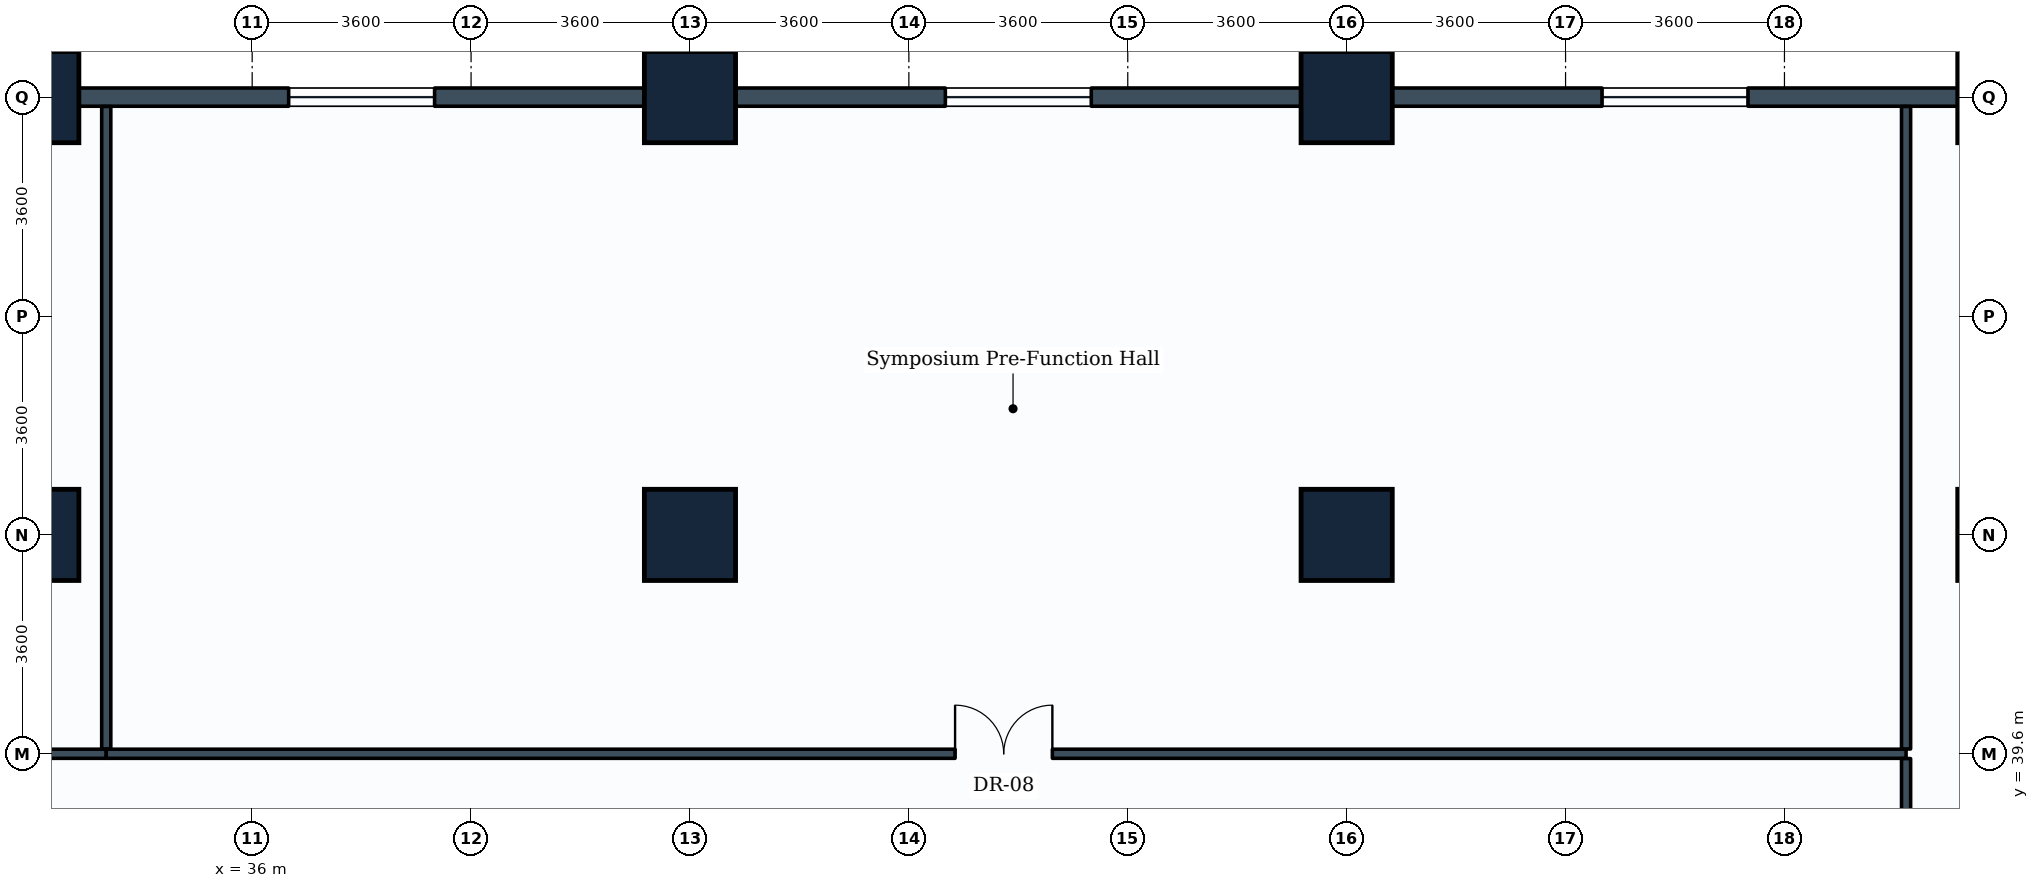
"""IFC4 building model, lengths in metres.
Left out: names, types, materials, properties, quantities, classifications, styles, units other than length and angle.
Written with IfcOpenShell. Run it as: python <this file> out.ifc"""

import sys

from ifc_helpers import new_model, si_unit, direction, frame, frame_2d, origin, origin_2d, place, context, subcontext, project, spatial, rectangle, extrude, element, fill, save


model = new_model("IFC4")
c1 = context("Model", 3, precision=1e-05, world=origin(), true_north=direction((0.0, 1.0)))
c2 = subcontext(c1, "Body", "Model", "MODEL_VIEW")
j1 = project(units=[si_unit("LENGTHUNIT", "METRE"), si_unit("PLANEANGLEUNIT", "RADIAN")], contexts=[c1])
p1 = place(None, origin())
s1 = spatial("IfcSite", under=j1, at=p1, CompositionType="ELEMENT")
p2 = place(p1, origin())
s2 = spatial("IfcBuilding", under=s1, at=p2, CompositionType="ELEMENT")
p3 = place(p2, frame((0.0, 0.0, 14.8)))
s3 = spatial("IfcBuildingStorey", under=s2, at=p3, CompositionType="ELEMENT", Elevation=14.8)
for number, where, z_axis, x_axis in (
    (1, (32.4, 43.2, 0.0), (0.0, 0.0, 1.0), (1.0, 0.0, 0.0)),
    (2, (32.4, 50.4, 0.0), (0.0, 0.0, 1.0), (1.0, 0.0, 0.0)),
    (3, (43.2, 43.2, 0.0), (0.0, 0.0, 1.0), (1.0, 0.0, 0.0)),
    (4, (43.2, 50.4, 0.0), (0.0, 0.0, 1.0), (1.0, 0.0, 0.0)),
    (5, (54.0, 43.2, 0.0), (0.0, 0.0, 1.0), (1.0, 0.0, 0.0)),
    (6, (54.0, 50.4, 0.0), (0.0, 0.0, 1.0), (1.0, 0.0, 0.0)),
    (7, (64.8, 43.2, 0.0), (0.0, 0.0, 1.0), (1.0, 0.0, 0.0)),
    (8, (64.8, 50.4, 0.0), (0.0, 0.0, 1.0), (1.0, 0.0, 0.0)),
):
    element("IfcColumn", number, at=place(p3, frame(where, z_axis=z_axis, x_axis=x_axis)), inside=s3, PredefinedType="COLUMN", context=c2, shape_type="SweptSolid", body=[
        extrude(rectangle(XDim=1.5, YDim=1.5, at=origin_2d()), origin(), (0.0, 0.0, 1.0), 4.6),
    ])
p4 = place(p3, frame((32.4, 50.4, 0.0), z_axis=(0.0, 0.0, 1.0), x_axis=(1.0, 0.0, 0.0)))
e9 = element("IfcWall", 9, at=p4, inside=s3, PredefinedType="STANDARD", context=c2, shape_type="SweptSolid", body=[
    extrude(rectangle(XDim=10.8, YDim=0.3, at=frame_2d((5.4, 0.0))), origin(), (0.0, 0.0, 1.0), 3.63),
])
p5 = place(p4, frame((4.2, 0.0, 0.85)))
e10 = element("IfcOpeningElement", 10, at=p5, cuts=e9, PredefinedType="OPENING", context=c2, shape_type="SweptSolid", body=[
    extrude(rectangle(XDim=2.4, YDim=1.6, at=frame_2d((1.2, 0.8))), frame((0.0, 0.16, 0.0), z_axis=(0.0, -1.0, 0.0), x_axis=(1.0, 0.0, 0.0)), (0.0, 0.0, 1.0), 0.32),
])
p6 = place(p3, frame((43.2, 50.4, 0.0), z_axis=(0.0, 0.0, 1.0), x_axis=(1.0, 0.0, 0.0)))
e11 = element("IfcWall", 11, at=p6, inside=s3, PredefinedType="STANDARD", context=c2, shape_type="SweptSolid", body=[
    extrude(rectangle(XDim=10.8, YDim=0.3, at=frame_2d((5.4, 0.0))), origin(), (0.0, 0.0, 1.0), 3.63),
])
p7 = place(p6, frame((4.2, 0.0, 0.85)))
e12 = element("IfcOpeningElement", 12, at=p7, cuts=e11, PredefinedType="OPENING", context=c2, shape_type="SweptSolid", body=[
    extrude(rectangle(XDim=2.4, YDim=1.6, at=frame_2d((1.2, 0.8))), frame((0.0, 0.16, 0.0), z_axis=(0.0, -1.0, 0.0), x_axis=(1.0, 0.0, 0.0)), (0.0, 0.0, 1.0), 0.32),
])
p8 = place(p3, frame((54.0, 50.4, 0.0), z_axis=(0.0, 0.0, 1.0), x_axis=(1.0, 0.0, 0.0)))
e13 = element("IfcWall", 13, at=p8, inside=s3, PredefinedType="STANDARD", context=c2, shape_type="SweptSolid", body=[
    extrude(rectangle(XDim=10.8, YDim=0.3, at=frame_2d((5.4, 0.0))), origin(), (0.0, 0.0, 1.0), 3.63),
])
p9 = place(p8, frame((4.2, 0.0, 0.85)))
e14 = element("IfcOpeningElement", 14, at=p9, cuts=e13, PredefinedType="OPENING", context=c2, shape_type="SweptSolid", body=[
    extrude(rectangle(XDim=2.4, YDim=1.6, at=frame_2d((1.2, 0.8))), frame((0.0, 0.16, 0.0), z_axis=(0.0, -1.0, 0.0), x_axis=(1.0, 0.0, 0.0)), (0.0, 0.0, 1.0), 0.32),
])
p10 = place(p3, frame((8.8, 39.6, 0.0), z_axis=(0.0, 0.0, 1.0), x_axis=(1.0, 0.0, 0.0)))
e15 = element("IfcWall", 15, at=p10, inside=s3, PredefinedType="PARTITIONING", context=c2, shape_type="SweptSolid", body=[
    extrude(rectangle(XDim=24.8, YDim=0.15, at=frame_2d((12.4, 0.0))), origin(), (0.0, 0.0, 1.0), 3.63),
])
p11 = place(p10, frame((10.841, 0.0, 0.0)))
e16 = element("IfcOpeningElement", 16, at=p11, cuts=e15, PredefinedType="OPENING", context=c2, shape_type="SweptSolid", body=[
    extrude(rectangle(XDim=1.6, YDim=2.2, at=frame_2d((0.8, 1.1))), frame((0.0, 0.085, 0.0), z_axis=(0.0, -1.0, 0.0), x_axis=(1.0, 0.0, 0.0)), (0.0, 0.0, 1.0), 0.17),
])
p12 = place(p3, frame((33.6, 39.679, 0.0), z_axis=(0.0, 0.0, 1.0), x_axis=(0.0, 1.0, 0.0)))
e17 = element("IfcWall", 17, at=p12, inside=s3, PredefinedType="PARTITIONING", context=c2, shape_type="SweptSolid", body=[
    extrude(rectangle(XDim=10.567, YDim=0.15, at=frame_2d((5.284, 0.0))), origin(), (0.0, 0.0, 1.0), 3.63),
])
p13 = place(p3, frame((33.6, 39.6, 0.0), z_axis=(0.0, 0.0, 1.0), x_axis=(1.0, 0.0, 0.0)))
e18 = element("IfcWall", 18, at=p13, inside=s3, PredefinedType="PARTITIONING", context=c2, shape_type="SweptSolid", body=[
    extrude(rectangle(XDim=29.6, YDim=0.15, at=frame_2d((14.8, 0.0))), origin(), (0.0, 0.0, 1.0), 3.63),
])
p14 = place(p13, frame((13.96, 0.0, 0.0)))
e19 = element("IfcOpeningElement", 19, at=p14, cuts=e18, PredefinedType="OPENING", context=c2, shape_type="SweptSolid", body=[
    extrude(rectangle(XDim=1.6, YDim=2.2, at=frame_2d((0.8, 1.1))), frame((0.0, 0.085, 0.0), z_axis=(0.0, -1.0, 0.0), x_axis=(1.0, 0.0, 0.0)), (0.0, 0.0, 1.0), 0.17),
])
p15 = place(p3, frame((63.2, 35.8, 0.0), z_axis=(0.0, 0.0, 1.0), x_axis=(0.0, 1.0, 0.0)))
e20 = element("IfcWall", 20, at=p15, inside=s3, PredefinedType="PARTITIONING", context=c2, shape_type="SweptSolid", body=[
    extrude(rectangle(XDim=3.721, YDim=0.15, at=frame_2d((1.86, 0.0))), origin(), (0.0, 0.0, 1.0), 4.285),
])
p16 = place(p15, frame((1.4, 0.0, 0.0)))
e21 = element("IfcOpeningElement", 21, at=p16, cuts=e20, PredefinedType="OPENING", context=c2, shape_type="SweptSolid", body=[
    extrude(rectangle(XDim=1.0, YDim=2.1, at=frame_2d((0.5, 1.05))), frame((0.0, 0.085, 0.0), z_axis=(0.0, -1.0, 0.0), x_axis=(1.0, 0.0, 0.0)), (0.0, 0.0, 1.0), 0.17),
])
p17 = place(p3, frame((63.2, 39.679, 0.0), z_axis=(0.0, 0.0, 1.0), x_axis=(0.0, 1.0, 0.0)))
e22 = element("IfcWall", 22, at=p17, inside=s3, PredefinedType="PARTITIONING", context=c2, shape_type="SweptSolid", body=[
    extrude(rectangle(XDim=10.567, YDim=0.15, at=frame_2d((5.284, 0.0))), origin(), (0.0, 0.0, 1.0), 3.63),
])
p18 = place(p5, origin())
e23 = element("IfcWindow", 23, at=p18, inside=s3, PartitioningType="SINGLE_PANEL", PredefinedType="WINDOW", context=c2, shape_type="SweptSolid", body=[
    extrude(rectangle(XDim=2.4, YDim=1.6, at=frame_2d((1.2, 0.8))), frame((0.0, 0.03, 0.0), z_axis=(0.0, -1.0, 0.0), x_axis=(1.0, 0.0, 0.0)), (0.0, 0.0, 1.0), 0.06),
])
fill(e10, e23)
p19 = place(p7, origin())
e24 = element("IfcWindow", 24, at=p19, inside=s3, PartitioningType="SINGLE_PANEL", PredefinedType="WINDOW", context=c2, shape_type="SweptSolid", body=[
    extrude(rectangle(XDim=2.4, YDim=1.6, at=frame_2d((1.2, 0.8))), frame((0.0, 0.03, 0.0), z_axis=(0.0, -1.0, 0.0), x_axis=(1.0, 0.0, 0.0)), (0.0, 0.0, 1.0), 0.06),
])
fill(e12, e24)
p20 = place(p9, origin())
e25 = element("IfcWindow", 25, at=p20, inside=s3, PartitioningType="SINGLE_PANEL", PredefinedType="WINDOW", context=c2, shape_type="SweptSolid", body=[
    extrude(rectangle(XDim=2.4, YDim=1.6, at=frame_2d((1.2, 0.8))), frame((0.0, 0.03, 0.0), z_axis=(0.0, -1.0, 0.0), x_axis=(1.0, 0.0, 0.0)), (0.0, 0.0, 1.0), 0.06),
])
fill(e14, e25)
p21 = place(p14, origin())
e26 = element("IfcDoor", 26, at=p21, inside=s3, OperationType="DOUBLE_DOOR_SINGLE_SWING", PredefinedType="DOOR", context=c2, shape_type="SweptSolid", body=[
    extrude(rectangle(XDim=1.6, YDim=2.2, at=frame_2d((0.8, 1.1))), frame((0.0, 0.025, 0.0), z_axis=(0.0, -1.0, 0.0), x_axis=(1.0, 0.0, 0.0)), (0.0, 0.0, 1.0), 0.05),
])
fill(e19, e26)
save(model, sys.argv[1])
